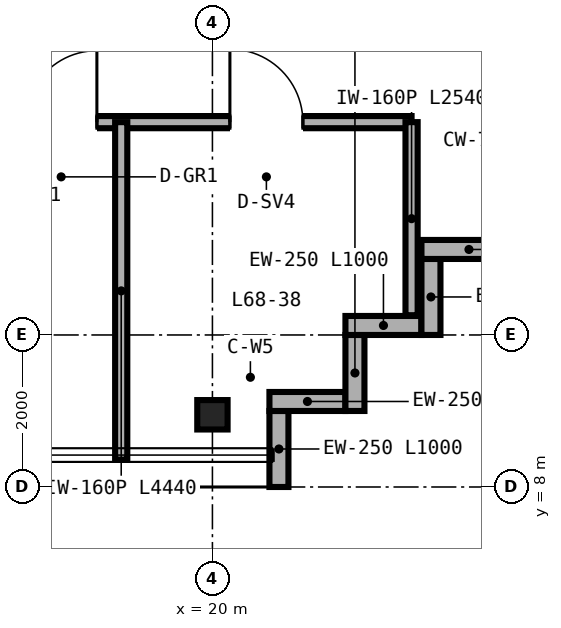
"""IFC4 building model, lengths in metres.
Left out: names, types, materials, properties, quantities, classifications, styles, units other than length and angle.
Written with IfcOpenShell. Run it as: python <this file> out.ifc"""

import sys

from ifc_helpers import new_model, si_unit, direction, frame, frame_2d, origin, origin_2d, place, context, subcontext, project, spatial, rectangle, i_section, extrude, source, transform, mapped, element, fill, save


model = new_model("IFC4")
c1 = context("Model", 3, precision=1e-05, world=origin(), true_north=direction((0.0, 1.0)))
c2 = subcontext(c1, "Body", "Model", "MODEL_VIEW")
j1 = project(units=[si_unit("LENGTHUNIT", "METRE"), si_unit("PLANEANGLEUNIT", "RADIAN")], contexts=[c1])
p1 = place(None, origin())
s1 = spatial("IfcSite", under=j1, at=p1, CompositionType="ELEMENT")
p2 = place(p1, origin())
s2 = spatial("IfcBuilding", under=s1, at=p2, CompositionType="ELEMENT")
p3 = place(p2, frame((0.0, 0.0, 268.8)))
s3 = spatial("IfcBuildingStorey", under=s2, at=p3, CompositionType="ELEMENT", Elevation=268.8)
m1 = source(origin(), c2, "Body", "SweptSolid", [
    extrude(i_section(OverallWidth=0.399, OverallDepth=0.387, WebThickness=0.021, FlangeThickness=0.033, FilletRadius=0.025, at=origin_2d()), origin(), (0.0, 0.0, 1.0), 3.28),
])
p4 = place(p3, frame((20.0, 8.95, 0.0), z_axis=(0.0, 0.0, 1.0), x_axis=(1.0, 0.0, 0.0)))
e1 = element("IfcColumn", 1, at=p4, inside=s3, PredefinedType="COLUMN", context=c2, shape_type="MappedRepresentation", body=[
    mapped(m1, transform((0.0, 0.0, 0.0), scale=1.0)),
])
for number, where, z_axis, x_axis in (
    (2, (20.875, 8.0, 0.0), (0.0, 0.0, 1.0), (0.0, 1.0, 0.0)),
    (3, (20.75, 9.125, 0.0), (0.0, 0.0, 1.0), (1.0, 0.0, 0.0)),
    (4, (21.875, 9.0, 0.0), (0.0, 0.0, 1.0), (0.0, 1.0, 0.0)),
    (5, (21.75, 10.125, 0.0), (0.0, 0.0, 1.0), (1.0, 0.0, 0.0)),
    (6, (22.875, 10.0, 0.0), (0.0, 0.0, 1.0), (0.0, 1.0, 0.0)),
):
    element("IfcWall", number, at=place(p3, frame(where, z_axis=z_axis, x_axis=x_axis)), inside=s3, PredefinedType="SOLIDWALL", context=c2, shape_type="SweptSolid", body=[
        extrude(rectangle(XDim=1.0, YDim=0.25, at=frame_2d((0.5, 0.0))), origin(), (0.0, 0.0, 1.0), 3.28),
    ])
p5 = place(p3, frame((22.75, 11.125, 0.0), z_axis=(0.0, 0.0, 1.0), x_axis=(1.0, 0.0, 0.0)))
e7 = element("IfcWall", 7, at=p5, inside=s3, PredefinedType="SOLIDWALL", context=c2, shape_type="SweptSolid", body=[
    extrude(rectangle(XDim=1.25, YDim=0.25, at=frame_2d((0.625, 0.0))), origin(), (0.0, 0.0, 1.0), 3.28),
])
p6 = place(p3, frame((11.1, 12.8, 0.0), z_axis=(0.0, 0.0, 1.0), x_axis=(1.0, 0.0, 0.0)))
e8 = element("IfcWall", 8, at=p6, inside=s3, PredefinedType="PARTITIONING", context=c2, shape_type="SweptSolid", body=[
    extrude(rectangle(XDim=11.52, YDim=0.16, at=frame_2d((5.76, 0.0))), origin(), (0.0, 0.0, 1.0), 3.28),
])
p7 = place(p6, frame((2.59, 0.0, 0.0)))
e9 = element("IfcOpeningElement", 9, at=p7, cuts=e8, PredefinedType="OPENING", context=c2, shape_type="SweptSolid", body=[
    extrude(rectangle(XDim=0.94, YDim=2.15, at=frame_2d((0.47, 1.075))), frame((0.0, 0.09, 0.0), z_axis=(0.0, -1.0, 0.0), x_axis=(1.0, 0.0, 0.0)), (0.0, 0.0, 1.0), 0.18),
])
p8 = place(p6, frame((6.44, 0.0, 0.0)))
e10 = element("IfcOpeningElement", 10, at=p8, cuts=e8, PredefinedType="OPENING", context=c2, shape_type="SweptSolid", body=[
    extrude(rectangle(XDim=0.94, YDim=2.15, at=frame_2d((0.47, 1.075))), frame((0.0, 0.09, 0.0), z_axis=(0.0, -1.0, 0.0), x_axis=(1.0, 0.0, 0.0)), (0.0, 0.0, 1.0), 0.18),
])
p9 = place(p6, frame((9.13, 0.0, 0.0)))
e11 = element("IfcOpeningElement", 11, at=p9, cuts=e8, PredefinedType="OPENING", context=c2, shape_type="SweptSolid", body=[
    extrude(rectangle(XDim=0.96, YDim=2.15, at=frame_2d((0.48, 1.075))), frame((0.0, 0.09, 0.0), z_axis=(0.0, -1.0, 0.0), x_axis=(1.0, 0.0, 0.0)), (0.0, 0.0, 1.0), 0.18),
])
p10 = place(p3, frame((22.62, 10.26, 0.0), z_axis=(0.0, 0.0, 1.0), x_axis=(0.0, 1.0, 0.0)))
e12 = element("IfcWall", 12, at=p10, inside=s3, PredefinedType="PARTITIONING", context=c2, shape_type="SweptSolid", body=[
    extrude(rectangle(XDim=2.54, YDim=0.16, at=frame_2d((1.27, 0.0))), origin(), (0.0, 0.0, 1.0), 3.28),
])
p11 = place(p3, frame((18.8, 8.36, 0.0), z_axis=(0.0, 0.0, 1.0), x_axis=(0.0, 1.0, 0.0)))
e13 = element("IfcWall", 13, at=p11, inside=s3, PredefinedType="PARTITIONING", context=c2, shape_type="SweptSolid", body=[
    extrude(rectangle(XDim=4.44, YDim=0.16, at=frame_2d((2.22, 0.0))), origin(), (0.0, 0.0, 1.0), 2.587),
])
m2 = source(origin(), c2, "Body", "SweptSolid", [
    extrude(rectangle(XDim=0.94, YDim=2.15, at=frame_2d((0.47, 1.075))), frame((0.0, 0.025, 0.0), z_axis=(0.0, -1.0, 0.0), x_axis=(1.0, 0.0, 0.0)), (0.0, 0.0, 1.0), 0.05),
])
p12 = place(p8, origin())
e14 = element("IfcDoor", 14, at=p12, inside=s3, OperationType="SINGLE_SWING_RIGHT", PredefinedType="DOOR", context=c2, shape_type="MappedRepresentation", body=[
    mapped(m2, transform((0.0, 0.0, 0.0), scale=1.0)),
])
fill(e10, e14)
m3 = source(origin(), c2, "Body", "SweptSolid", [
    extrude(rectangle(XDim=0.96, YDim=2.15, at=frame_2d((0.48, 1.075))), frame((0.0, 0.025, 0.0), z_axis=(0.0, -1.0, 0.0), x_axis=(1.0, 0.0, 0.0)), (0.0, 0.0, 1.0), 0.05),
])
p13 = place(p9, origin())
e15 = element("IfcDoor", 15, at=p13, inside=s3, OperationType="SINGLE_SWING_LEFT", PredefinedType="DOOR", context=c2, shape_type="MappedRepresentation", body=[
    mapped(m3, transform((0.0, 0.0, 0.0), scale=1.0)),
])
fill(e11, e15)
save(model, sys.argv[1])
